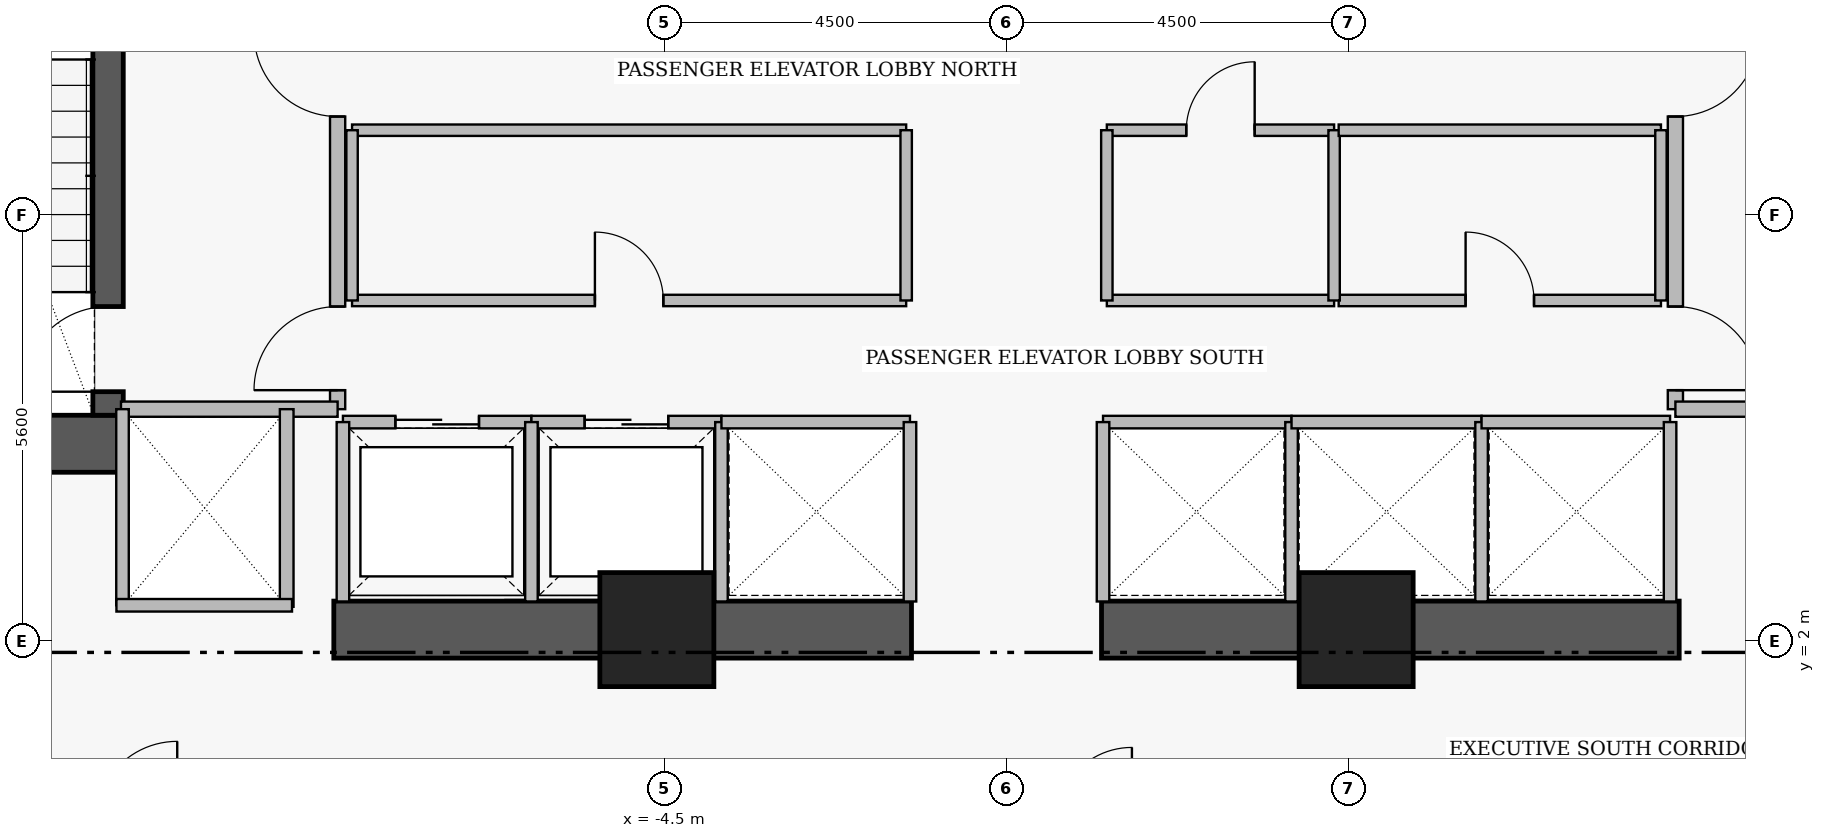
"""IFC4 building model, lengths in metres.
Left out: names, types, materials, properties, quantities, classifications, styles, units other than length and angle.
Written with IfcOpenShell. Run it as: python <this file> out.ifc"""

import sys

from ifc_helpers import new_model, si_unit, direction, frame, frame_2d, origin, origin_2d, place, context, subcontext, project, spatial, rectangle, extrude, element, fill, save


model = new_model("IFC4")
c1 = context("Model", 3, precision=1e-05, world=origin(), true_north=direction((0.0, 1.0)))
c2 = subcontext(c1, "Body", "Model", "MODEL_VIEW")
j1 = project(units=[si_unit("LENGTHUNIT", "METRE"), si_unit("PLANEANGLEUNIT", "RADIAN")], contexts=[c1])
p1 = place(None, origin())
s1 = spatial("IfcSite", under=j1, at=p1, CompositionType="ELEMENT")
p2 = place(p1, origin())
s2 = spatial("IfcBuilding", under=s1, at=p2, CompositionType="ELEMENT")
p3 = place(p2, frame((0.0, 0.0, 106.6)))
s3 = spatial("IfcBuildingStorey", under=s2, at=p3, CompositionType="ELEMENT", Elevation=106.6)
p4 = place(p3, frame((-16.16, 4.595, 0.0), z_axis=(0.0, 0.0, 1.0), x_axis=(1.0, 0.0, 0.0)))
e1 = element("IfcWall", 1, at=p4, inside=s3, PredefinedType="SHEAR", context=c2, shape_type="SweptSolid", body=[
    extrude(rectangle(XDim=4.56, YDim=0.75, at=frame_2d((2.28, 0.0))), origin(), (0.0, 0.0, 1.0), 3.46),
])
for number, where, z_axis, x_axis in (
    (2, (-8.85, 2.15, 0.0), (0.0, 0.0, 1.0), (1.0, 0.0, 0.0)),
    (3, (1.25, 2.15, 0.0), (0.0, 0.0, 1.0), (1.0, 0.0, 0.0)),
):
    element("IfcWall", number, at=place(p3, frame(where, z_axis=z_axis, x_axis=x_axis)), inside=s3, PredefinedType="SHEAR", context=c2, shape_type="SweptSolid", body=[
        extrude(rectangle(XDim=7.6, YDim=0.75, at=frame_2d((3.8, 0.0))), origin(), (0.0, 0.0, 1.0), 3.43),
    ])
p5 = place(p3, frame((-11.82, 4.97, 0.0), z_axis=(0.0, 0.0, 1.0), x_axis=(0.0, 1.0, 0.0)))
e4 = element("IfcWall", 4, at=p5, inside=s3, PredefinedType="SHEAR", context=c2, shape_type="SweptSolid", body=[
    extrude(rectangle(XDim=8.96, YDim=0.4, at=frame_2d((4.48, 0.0))), origin(), (0.0, 0.0, 1.0), 3.46),
])
p6 = place(p5, frame((0.31, 0.0, 0.0)))
e5 = element("IfcOpeningElement", 5, at=p6, cuts=e4, PredefinedType="OPENING", context=c2, shape_type="SweptSolid", body=[
    extrude(rectangle(XDim=1.12, YDim=2.22, at=frame_2d((0.56, 1.11))), frame((0.0, 0.21, 0.0), z_axis=(0.0, -1.0, 0.0), x_axis=(1.0, 0.0, 0.0)), (0.0, 0.0, 1.0), 0.42),
])
for number, where, z_axis, x_axis in (
    (6, (-4.6, 2.15, 0.0), (0.0, 0.0, 1.0), (1.0, 0.0, 0.0)),
    (7, (4.6, 2.15, 0.0), (0.0, 0.0, 1.0), (1.0, 0.0, 0.0)),
):
    element("IfcColumn", number, at=place(p3, frame(where, z_axis=z_axis, x_axis=x_axis)), inside=s3, PredefinedType="COLUMN", context=c2, shape_type="SweptSolid", body=[
        extrude(rectangle(XDim=1.5, YDim=1.5, at=origin_2d()), origin(), (0.0, 0.0, 1.0), 3.65),
    ])
p7 = place(p3, frame((-8.8, 5.05, 0.0), z_axis=(0.0, 0.0, 1.0), x_axis=(0.0, 1.0, 0.0)))
e8 = element("IfcWall", 8, at=p7, inside=s3, PredefinedType="PARTITIONING", context=c2, shape_type="SweptSolid", body=[
    extrude(rectangle(XDim=6.1, YDim=0.2, at=frame_2d((3.05, 0.0))), origin(), (0.0, 0.0, 1.0), 3.43),
])
p8 = place(p7, frame((0.25, 0.0, 0.0)))
e9 = element("IfcOpeningElement", 9, at=p8, cuts=e8, PredefinedType="OPENING", context=c2, shape_type="SweptSolid", body=[
    extrude(rectangle(XDim=1.1, YDim=2.2, at=frame_2d((0.55, 1.1))), frame((0.0, 0.11, 0.0), z_axis=(0.0, -1.0, 0.0), x_axis=(1.0, 0.0, 0.0)), (0.0, 0.0, 1.0), 0.22),
])
p9 = place(p7, frame((3.85, 0.0, 0.0)))
e10 = element("IfcOpeningElement", 10, at=p9, cuts=e8, PredefinedType="OPENING", context=c2, shape_type="SweptSolid", body=[
    extrude(rectangle(XDim=1.1, YDim=2.2, at=frame_2d((0.55, 1.1))), frame((0.0, 0.11, 0.0), z_axis=(0.0, -1.0, 0.0), x_axis=(1.0, 0.0, 0.0)), (0.0, 0.0, 1.0), 0.22),
])
p10 = place(p3, frame((8.8, 11.15, 0.0), z_axis=(0.0, 0.0, 1.0), x_axis=(0.0, -1.0, 0.0)))
e11 = element("IfcWall", 11, at=p10, inside=s3, PredefinedType="PARTITIONING", context=c2, shape_type="SweptSolid", body=[
    extrude(rectangle(XDim=6.1, YDim=0.2, at=frame_2d((3.05, 0.0))), origin(), (0.0, 0.0, 1.0), 3.43),
])
p11 = place(p10, frame((1.15, 0.0, 0.0)))
e12 = element("IfcOpeningElement", 12, at=p11, cuts=e11, PredefinedType="OPENING", context=c2, shape_type="SweptSolid", body=[
    extrude(rectangle(XDim=1.1, YDim=2.2, at=frame_2d((0.55, 1.1))), frame((0.0, 0.11, 0.0), z_axis=(0.0, -1.0, 0.0), x_axis=(1.0, 0.0, 0.0)), (0.0, 0.0, 1.0), 0.22),
])
p12 = place(p10, frame((4.75, 0.0, 0.0)))
e13 = element("IfcOpeningElement", 13, at=p12, cuts=e11, PredefinedType="OPENING", context=c2, shape_type="SweptSolid", body=[
    extrude(rectangle(XDim=1.1, YDim=2.2, at=frame_2d((0.55, 1.1))), frame((0.0, 0.11, 0.0), z_axis=(0.0, -1.0, 0.0), x_axis=(1.0, 0.0, 0.0)), (0.0, 0.0, 1.0), 0.22),
])
p13 = place(p3, frame((-8.73, 4.88, 0.0), z_axis=(0.0, 0.0, 1.0), x_axis=(1.0, 0.0, 0.0)))
e14 = element("IfcWall", 14, at=p13, inside=s3, PredefinedType="PARTITIONING", context=c2, shape_type="SweptSolid", body=[
    extrude(rectangle(XDim=2.48, YDim=0.165, at=frame_2d((1.24, 0.0))), origin(), (0.0, 0.0, 1.0), 3.43),
])
p14 = place(p13, frame((0.69, 0.0, 0.0)))
e15 = element("IfcOpeningElement", 15, at=p14, cuts=e14, PredefinedType="OPENING", context=c2, shape_type="SweptSolid", body=[
    extrude(rectangle(XDim=1.1, YDim=2.25, at=frame_2d((0.55, 1.125))), frame((0.0, 0.093, 0.0), z_axis=(0.0, -1.0, 0.0), x_axis=(1.0, 0.0, 0.0)), (0.0, 0.0, 1.0), 0.185),
])
p15 = place(p3, frame((-6.25, 4.88, 0.0), z_axis=(0.0, 0.0, 1.0), x_axis=(1.0, 0.0, 0.0)))
e16 = element("IfcWall", 16, at=p15, inside=s3, PredefinedType="PARTITIONING", context=c2, shape_type="SweptSolid", body=[
    extrude(rectangle(XDim=2.5, YDim=0.165, at=frame_2d((1.25, 0.0))), origin(), (0.0, 0.0, 1.0), 3.43),
])
p16 = place(p15, frame((0.7, 0.0, 0.0)))
e17 = element("IfcOpeningElement", 17, at=p16, cuts=e16, PredefinedType="OPENING", context=c2, shape_type="SweptSolid", body=[
    extrude(rectangle(XDim=1.1, YDim=2.25, at=frame_2d((0.55, 1.125))), frame((0.0, 0.093, 0.0), z_axis=(0.0, -1.0, 0.0), x_axis=(1.0, 0.0, 0.0)), (0.0, 0.0, 1.0), 0.185),
])
p17 = place(p3, frame((-8.61, 6.48, 0.0), z_axis=(0.0, 0.0, 1.0), x_axis=(1.0, 0.0, 0.0)))
e18 = element("IfcWall", 18, at=p17, inside=s3, PredefinedType="PARTITIONING", context=c2, shape_type="SweptSolid", body=[
    extrude(rectangle(XDim=7.29, YDim=0.15, at=frame_2d((3.645, 0.0))), origin(), (0.0, 0.0, 1.0), 3.43),
])
p18 = place(p17, frame((3.195, 0.0, 0.0)))
e19 = element("IfcOpeningElement", 19, at=p18, cuts=e18, PredefinedType="OPENING", context=c2, shape_type="SweptSolid", body=[
    extrude(rectangle(XDim=0.9, YDim=2.15, at=frame_2d((0.45, 1.075))), frame((0.0, 0.085, 0.0), z_axis=(0.0, -1.0, 0.0), x_axis=(1.0, 0.0, 0.0)), (0.0, 0.0, 1.0), 0.17),
])
p19 = place(p3, frame((1.32, 8.72, 0.0), z_axis=(0.0, 0.0, 1.0), x_axis=(1.0, 0.0, 0.0)))
e20 = element("IfcWall", 20, at=p19, inside=s3, PredefinedType="PARTITIONING", context=c2, shape_type="SweptSolid", body=[
    extrude(rectangle(XDim=2.99, YDim=0.15, at=frame_2d((1.495, 0.0))), origin(), (0.0, 0.0, 1.0), 3.43),
])
p20 = place(p19, frame((1.045, 0.0, 0.0)))
e21 = element("IfcOpeningElement", 21, at=p20, cuts=e20, PredefinedType="OPENING", context=c2, shape_type="SweptSolid", body=[
    extrude(rectangle(XDim=0.9, YDim=2.15, at=frame_2d((0.45, 1.075))), frame((0.0, 0.085, 0.0), z_axis=(0.0, -1.0, 0.0), x_axis=(1.0, 0.0, 0.0)), (0.0, 0.0, 1.0), 0.17),
])
p21 = place(p3, frame((4.37, 6.48, 0.0), z_axis=(0.0, 0.0, 1.0), x_axis=(1.0, 0.0, 0.0)))
e22 = element("IfcWall", 22, at=p21, inside=s3, PredefinedType="PARTITIONING", context=c2, shape_type="SweptSolid", body=[
    extrude(rectangle(XDim=4.24, YDim=0.15, at=frame_2d((2.12, 0.0))), origin(), (0.0, 0.0, 1.0), 3.43),
])
p22 = place(p21, frame((1.67, 0.0, 0.0)))
e23 = element("IfcOpeningElement", 23, at=p22, cuts=e22, PredefinedType="OPENING", context=c2, shape_type="SweptSolid", body=[
    extrude(rectangle(XDim=0.9, YDim=2.15, at=frame_2d((0.45, 1.075))), frame((0.0, 0.085, 0.0), z_axis=(0.0, -1.0, 0.0), x_axis=(1.0, 0.0, 0.0)), (0.0, 0.0, 1.0), 0.17),
])
for number, where, z_axis, x_axis in (
    (24, (-11.65, 5.05, 0.0), (0.0, 0.0, 1.0), (1.0, 0.0, 0.0)),
    (25, (8.8, 5.05, 0.0), (0.0, 0.0, 1.0), (1.0, 0.0, 0.0)),
):
    element("IfcWall", number, at=place(p3, frame(where, z_axis=z_axis, x_axis=x_axis)), inside=s3, PredefinedType="PARTITIONING", context=c2, shape_type="SweptSolid", body=[
        extrude(rectangle(XDim=2.85, YDim=0.2, at=frame_2d((1.425, 0.0))), origin(), (0.0, 0.0, 1.0), 3.43),
    ])
for number, where, z_axis, x_axis in (
    (26, (-8.73, 2.52, 0.0), (0.0, 0.0, 1.0), (0.0, 1.0, 0.0)),
    (27, (-6.25, 2.52, 0.0), (0.0, 0.0, 1.0), (0.0, 1.0, 0.0)),
    (28, (-3.75, 2.52, 0.0), (0.0, 0.0, 1.0), (0.0, 1.0, 0.0)),
):
    element("IfcWall", number, at=place(p3, frame(where, z_axis=z_axis, x_axis=x_axis)), inside=s3, PredefinedType="PARTITIONING", context=c2, shape_type="SweptSolid", body=[
        extrude(rectangle(XDim=2.36, YDim=0.165, at=frame_2d((1.18, 0.0))), origin(), (0.0, 0.0, 1.0), 3.43),
    ])
p23 = place(p3, frame((-3.75, 4.88, 0.0), z_axis=(0.0, 0.0, 1.0), x_axis=(1.0, 0.0, 0.0)))
e29 = element("IfcWall", 29, at=p23, inside=s3, PredefinedType="PARTITIONING", context=c2, shape_type="SweptSolid", body=[
    extrude(rectangle(XDim=2.48, YDim=0.165, at=frame_2d((1.24, 0.0))), origin(), (0.0, 0.0, 1.0), 3.43),
])
p24 = place(p3, frame((-1.27, 2.52, 0.0), z_axis=(0.0, 0.0, 1.0), x_axis=(0.0, 1.0, 0.0)))
e30 = element("IfcWall", 30, at=p24, inside=s3, PredefinedType="PARTITIONING", context=c2, shape_type="SweptSolid", body=[
    extrude(rectangle(XDim=2.36, YDim=0.165, at=frame_2d((1.18, 0.0))), origin(), (0.0, 0.0, 1.0), 3.43),
])
p25 = place(p3, frame((1.27, 4.88, 0.0), z_axis=(0.0, 0.0, 1.0), x_axis=(1.0, 0.0, 0.0)))
e31 = element("IfcWall", 31, at=p25, inside=s3, PredefinedType="PARTITIONING", context=c2, shape_type="SweptSolid", body=[
    extrude(rectangle(XDim=2.48, YDim=0.165, at=frame_2d((1.24, 0.0))), origin(), (0.0, 0.0, 1.0), 3.43),
])
for number, where, z_axis, x_axis in (
    (32, (1.27, 2.52, 0.0), (0.0, 0.0, 1.0), (0.0, 1.0, 0.0)),
    (33, (3.75, 2.52, 0.0), (0.0, 0.0, 1.0), (0.0, 1.0, 0.0)),
):
    element("IfcWall", number, at=place(p3, frame(where, z_axis=z_axis, x_axis=x_axis)), inside=s3, PredefinedType="PARTITIONING", context=c2, shape_type="SweptSolid", body=[
        extrude(rectangle(XDim=2.36, YDim=0.165, at=frame_2d((1.18, 0.0))), origin(), (0.0, 0.0, 1.0), 3.43),
    ])
p26 = place(p3, frame((3.75, 4.88, 0.0), z_axis=(0.0, 0.0, 1.0), x_axis=(1.0, 0.0, 0.0)))
e34 = element("IfcWall", 34, at=p26, inside=s3, PredefinedType="PARTITIONING", context=c2, shape_type="SweptSolid", body=[
    extrude(rectangle(XDim=2.5, YDim=0.165, at=frame_2d((1.25, 0.0))), origin(), (0.0, 0.0, 1.0), 3.43),
])
p27 = place(p3, frame((6.25, 2.52, 0.0), z_axis=(0.0, 0.0, 1.0), x_axis=(0.0, 1.0, 0.0)))
e35 = element("IfcWall", 35, at=p27, inside=s3, PredefinedType="PARTITIONING", context=c2, shape_type="SweptSolid", body=[
    extrude(rectangle(XDim=2.36, YDim=0.165, at=frame_2d((1.18, 0.0))), origin(), (0.0, 0.0, 1.0), 3.43),
])
p28 = place(p3, frame((6.25, 4.88, 0.0), z_axis=(0.0, 0.0, 1.0), x_axis=(1.0, 0.0, 0.0)))
e36 = element("IfcWall", 36, at=p28, inside=s3, PredefinedType="PARTITIONING", context=c2, shape_type="SweptSolid", body=[
    extrude(rectangle(XDim=2.48, YDim=0.165, at=frame_2d((1.24, 0.0))), origin(), (0.0, 0.0, 1.0), 3.43),
])
p29 = place(p3, frame((8.73, 2.52, 0.0), z_axis=(0.0, 0.0, 1.0), x_axis=(0.0, 1.0, 0.0)))
e37 = element("IfcWall", 37, at=p29, inside=s3, PredefinedType="PARTITIONING", context=c2, shape_type="SweptSolid", body=[
    extrude(rectangle(XDim=2.36, YDim=0.165, at=frame_2d((1.18, 0.0))), origin(), (0.0, 0.0, 1.0), 3.43),
])
p30 = place(p3, frame((-9.47, 2.45, 0.0), z_axis=(0.0, 0.0, 1.0), x_axis=(0.0, 1.0, 0.0)))
e38 = element("IfcWall", 38, at=p30, inside=s3, PredefinedType="PARTITIONING", context=c2, shape_type="SweptSolid", body=[
    extrude(rectangle(XDim=2.6, YDim=0.18, at=frame_2d((1.3, 0.0))), origin(), (0.0, 0.0, 1.0), 3.43),
])
p31 = place(p3, frame((-11.63, 2.47, 0.0), z_axis=(0.0, 0.0, 1.0), x_axis=(0.0, 1.0, 0.0)))
e39 = element("IfcWall", 39, at=p31, inside=s3, PredefinedType="PARTITIONING", context=c2, shape_type="SweptSolid", body=[
    extrude(rectangle(XDim=2.58, YDim=0.165, at=frame_2d((1.29, 0.0))), origin(), (0.0, 0.0, 1.0), 3.43),
])
p32 = place(p3, frame((-11.71, 2.47, 0.0), z_axis=(0.0, 0.0, 1.0), x_axis=(1.0, 0.0, 0.0)))
e40 = element("IfcWall", 40, at=p32, inside=s3, PredefinedType="PARTITIONING", context=c2, shape_type="SweptSolid", body=[
    extrude(rectangle(XDim=2.31, YDim=0.165, at=frame_2d((1.155, 0.0))), origin(), (0.0, 0.0, 1.0), 2.03),
])
p33 = place(p3, frame((-8.61, 8.72, 0.0), z_axis=(0.0, 0.0, 1.0), x_axis=(1.0, 0.0, 0.0)))
e41 = element("IfcWall", 41, at=p33, inside=s3, PredefinedType="PARTITIONING", context=c2, shape_type="SweptSolid", body=[
    extrude(rectangle(XDim=7.29, YDim=0.15, at=frame_2d((3.645, 0.0))), origin(), (0.0, 0.0, 1.0), 3.43),
])
for number, where, z_axis, x_axis in (
    (42, (-8.61, 6.48, 0.0), (0.0, 0.0, 1.0), (0.0, 1.0, 0.0)),
    (43, (-1.32, 6.48, 0.0), (0.0, 0.0, 1.0), (0.0, 1.0, 0.0)),
):
    element("IfcWall", number, at=place(p3, frame(where, z_axis=z_axis, x_axis=x_axis)), inside=s3, PredefinedType="PARTITIONING", context=c2, shape_type="SweptSolid", body=[
        extrude(rectangle(XDim=2.24, YDim=0.15, at=frame_2d((1.12, 0.0))), origin(), (0.0, 0.0, 1.0), 3.43),
    ])
p34 = place(p3, frame((1.32, 6.48, 0.0), z_axis=(0.0, 0.0, 1.0), x_axis=(1.0, 0.0, 0.0)))
e44 = element("IfcWall", 44, at=p34, inside=s3, PredefinedType="PARTITIONING", context=c2, shape_type="SweptSolid", body=[
    extrude(rectangle(XDim=2.99, YDim=0.15, at=frame_2d((1.495, 0.0))), origin(), (0.0, 0.0, 1.0), 3.43),
])
for number, where, z_axis, x_axis in (
    (45, (1.32, 6.48, 0.0), (0.0, 0.0, 1.0), (0.0, 1.0, 0.0)),
    (46, (4.31, 6.48, 0.0), (0.0, 0.0, 1.0), (0.0, 1.0, 0.0)),
):
    element("IfcWall", number, at=place(p3, frame(where, z_axis=z_axis, x_axis=x_axis)), inside=s3, PredefinedType="PARTITIONING", context=c2, shape_type="SweptSolid", body=[
        extrude(rectangle(XDim=2.24, YDim=0.15, at=frame_2d((1.12, 0.0))), origin(), (0.0, 0.0, 1.0), 3.43),
    ])
p35 = place(p3, frame((4.37, 8.72, 0.0), z_axis=(0.0, 0.0, 1.0), x_axis=(1.0, 0.0, 0.0)))
e47 = element("IfcWall", 47, at=p35, inside=s3, PredefinedType="PARTITIONING", context=c2, shape_type="SweptSolid", body=[
    extrude(rectangle(XDim=4.24, YDim=0.15, at=frame_2d((2.12, 0.0))), origin(), (0.0, 0.0, 1.0), 3.43),
])
p36 = place(p3, frame((8.61, 6.48, 0.0), z_axis=(0.0, 0.0, 1.0), x_axis=(0.0, 1.0, 0.0)))
e48 = element("IfcWall", 48, at=p36, inside=s3, PredefinedType="PARTITIONING", context=c2, shape_type="SweptSolid", body=[
    extrude(rectangle(XDim=2.24, YDim=0.15, at=frame_2d((1.12, 0.0))), origin(), (0.0, 0.0, 1.0), 3.43),
])
p37 = place(p6, origin())
e49 = element("IfcDoor", 49, at=p37, inside=s3, OperationType="SINGLE_SWING_LEFT", PredefinedType="DOOR", context=c2, shape_type="SweptSolid", body=[
    extrude(rectangle(XDim=1.12, YDim=2.22, at=frame_2d((0.56, 1.11))), frame((0.0, 0.025, 0.0), z_axis=(0.0, -1.0, 0.0), x_axis=(1.0, 0.0, 0.0)), (0.0, 0.0, 1.0), 0.05),
])
fill(e5, e49)
p38 = place(p8, origin())
e50 = element("IfcDoor", 50, at=p38, inside=s3, OperationType="SINGLE_SWING_LEFT", PredefinedType="DOOR", context=c2, shape_type="SweptSolid", body=[
    extrude(rectangle(XDim=1.1, YDim=2.2, at=frame_2d((0.55, 1.1))), frame((0.0, 0.025, 0.0), z_axis=(0.0, -1.0, 0.0), x_axis=(1.0, 0.0, 0.0)), (0.0, 0.0, 1.0), 0.05),
])
fill(e9, e50)
p39 = place(p9, origin())
e51 = element("IfcDoor", 51, at=p39, inside=s3, OperationType="SINGLE_SWING_RIGHT", PredefinedType="DOOR", context=c2, shape_type="SweptSolid", body=[
    extrude(rectangle(XDim=1.1, YDim=2.2, at=frame_2d((0.55, 1.1))), frame((0.0, 0.025, 0.0), z_axis=(0.0, -1.0, 0.0), x_axis=(1.0, 0.0, 0.0)), (0.0, 0.0, 1.0), 0.05),
])
fill(e10, e51)
p40 = place(p11, origin())
e52 = element("IfcDoor", 52, at=p40, inside=s3, OperationType="SINGLE_SWING_LEFT", PredefinedType="DOOR", context=c2, shape_type="SweptSolid", body=[
    extrude(rectangle(XDim=1.1, YDim=2.2, at=frame_2d((0.55, 1.1))), frame((0.0, 0.025, 0.0), z_axis=(0.0, -1.0, 0.0), x_axis=(1.0, 0.0, 0.0)), (0.0, 0.0, 1.0), 0.05),
])
fill(e12, e52)
p41 = place(p12, origin())
e53 = element("IfcDoor", 53, at=p41, inside=s3, OperationType="SINGLE_SWING_RIGHT", PredefinedType="DOOR", context=c2, shape_type="SweptSolid", body=[
    extrude(rectangle(XDim=1.1, YDim=2.2, at=frame_2d((0.55, 1.1))), frame((0.0, 0.025, 0.0), z_axis=(0.0, -1.0, 0.0), x_axis=(1.0, 0.0, 0.0)), (0.0, 0.0, 1.0), 0.05),
])
fill(e13, e53)
p42 = place(p14, origin())
e54 = element("IfcDoor", 54, at=p42, inside=s3, OperationType="SLIDING_TO_LEFT", PredefinedType="DOOR", context=c2, shape_type="SweptSolid", body=[
    extrude(rectangle(XDim=1.1, YDim=2.25, at=frame_2d((0.55, 1.125))), frame((0.0, 0.025, 0.0), z_axis=(0.0, -1.0, 0.0), x_axis=(1.0, 0.0, 0.0)), (0.0, 0.0, 1.0), 0.05),
])
fill(e15, e54)
p43 = place(p16, origin())
e55 = element("IfcDoor", 55, at=p43, inside=s3, OperationType="SLIDING_TO_LEFT", PredefinedType="DOOR", context=c2, shape_type="SweptSolid", body=[
    extrude(rectangle(XDim=1.1, YDim=2.25, at=frame_2d((0.55, 1.125))), frame((0.0, 0.025, 0.0), z_axis=(0.0, -1.0, 0.0), x_axis=(1.0, 0.0, 0.0)), (0.0, 0.0, 1.0), 0.05),
])
fill(e17, e55)
p44 = place(p18, origin())
e56 = element("IfcDoor", 56, at=p44, inside=s3, OperationType="SINGLE_SWING_LEFT", PredefinedType="DOOR", context=c2, shape_type="SweptSolid", body=[
    extrude(rectangle(XDim=0.9, YDim=2.15, at=frame_2d((0.45, 1.075))), frame((0.0, 0.025, 0.0), z_axis=(0.0, -1.0, 0.0), x_axis=(1.0, 0.0, 0.0)), (0.0, 0.0, 1.0), 0.05),
])
fill(e19, e56)
p45 = place(p20, origin())
e57 = element("IfcDoor", 57, at=p45, inside=s3, OperationType="SINGLE_SWING_RIGHT", PredefinedType="DOOR", context=c2, shape_type="SweptSolid", body=[
    extrude(rectangle(XDim=0.9, YDim=2.15, at=frame_2d((0.45, 1.075))), frame((0.0, 0.025, 0.0), z_axis=(0.0, -1.0, 0.0), x_axis=(1.0, 0.0, 0.0)), (0.0, 0.0, 1.0), 0.05),
])
fill(e21, e57)
p46 = place(p22, origin())
e58 = element("IfcDoor", 58, at=p46, inside=s3, OperationType="SINGLE_SWING_LEFT", PredefinedType="DOOR", context=c2, shape_type="SweptSolid", body=[
    extrude(rectangle(XDim=0.9, YDim=2.15, at=frame_2d((0.45, 1.075))), frame((0.0, 0.025, 0.0), z_axis=(0.0, -1.0, 0.0), x_axis=(1.0, 0.0, 0.0)), (0.0, 0.0, 1.0), 0.05),
])
fill(e23, e58)
save(model, sys.argv[1])
